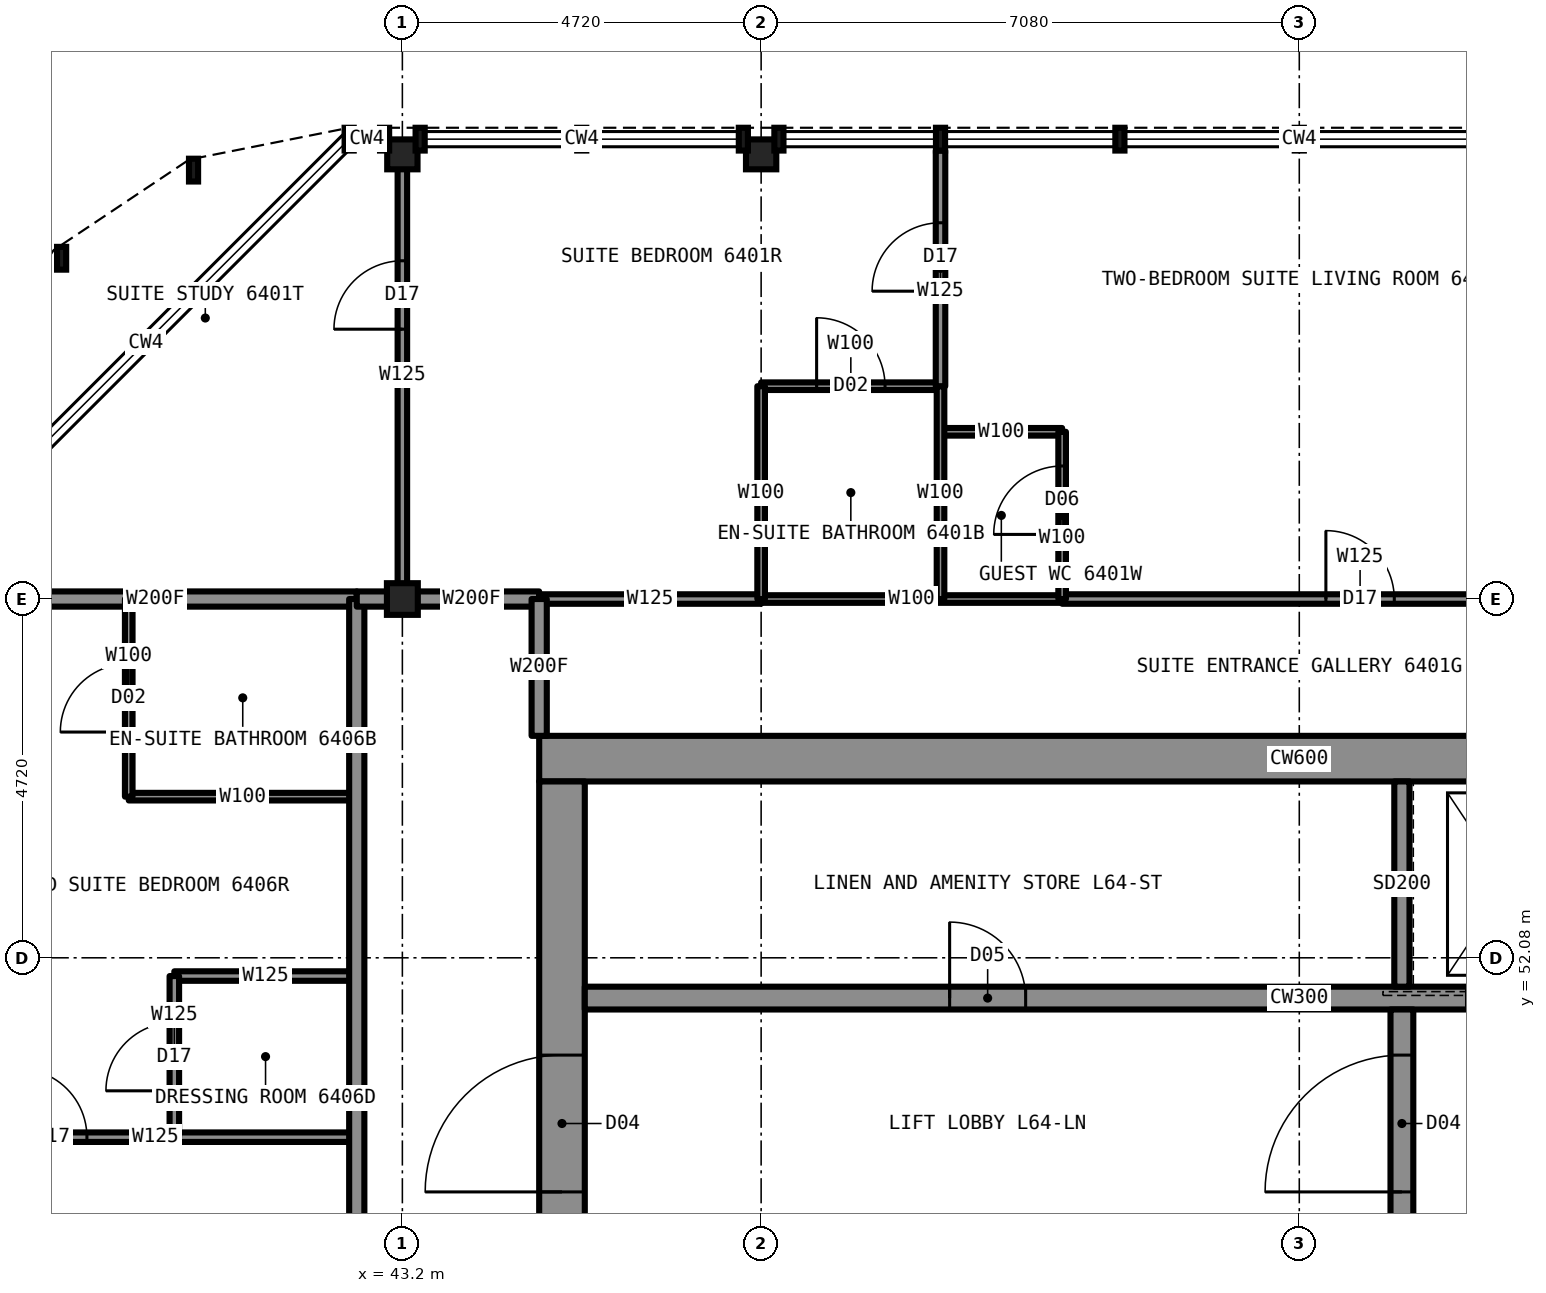
"""IFC4 building model, lengths in metres.
Left out: names, types, materials, properties, quantities, classifications, styles, units other than length and angle.
Written with IfcOpenShell. Run it as: python <this file> out.ifc"""

import sys

from ifc_helpers import new_model, si_unit, direction, frame, frame_2d, origin, origin_2d, place, context, subcontext, project, spatial, rectangle, i_section, extrude, element, fill, save


model = new_model("IFC4")
c1 = context("Model", 3, precision=1e-05, world=origin(), true_north=direction((0.0, 1.0)))
c2 = subcontext(c1, "Body", "Model", "MODEL_VIEW")
j1 = project(units=[si_unit("LENGTHUNIT", "METRE"), si_unit("PLANEANGLEUNIT", "RADIAN")], contexts=[c1])
p1 = place(None, origin())
s1 = spatial("IfcSite", under=j1, at=p1, CompositionType="ELEMENT")
p2 = place(p1, origin())
s2 = spatial("IfcBuilding", under=s1, at=p2, CompositionType="ELEMENT")
p3 = place(p2, frame((0.0, 0.0, 237.2)))
s3 = spatial("IfcBuildingStorey", under=s2, at=p3, CompositionType="ELEMENT", Elevation=237.2)
for number, where, z_axis, x_axis in (
    (1, (43.2, 62.65, 0.0), (0.0, 0.0, 1.0), (1.0, 0.0, 0.0)),
    (2, (47.92, 62.65, 0.0), (0.0, 0.0, 1.0), (1.0, 0.0, 0.0)),
):
    element("IfcColumn", number, at=place(p3, frame(where, z_axis=z_axis, x_axis=x_axis)), inside=s3, PredefinedType="COLUMN", context=c2, shape_type="SweptSolid", body=[
        extrude(i_section(OverallWidth=0.399, OverallDepth=0.394, WebThickness=0.023, FlangeThickness=0.037, at=origin_2d()), origin(), (0.0, 0.0, 1.0), 3.5),
    ])
p4 = place(p3, frame((43.2, 56.8, 0.0), z_axis=(0.0, 0.0, 1.0), x_axis=(1.0, 0.0, 0.0)))
e3 = element("IfcColumn", 3, at=p4, inside=s3, PredefinedType="COLUMN", context=c2, shape_type="SweptSolid", body=[
    extrude(i_section(OverallWidth=0.406, OverallDepth=0.417, WebThickness=0.03, FlangeThickness=0.048, at=origin_2d()), origin(), (0.0, 0.0, 1.0), 3.5),
])
p5 = place(p3, frame((45.0, 54.7, 0.0), z_axis=(0.0, 0.0, 1.0), x_axis=(1.0, 0.0, 0.0)))
e4 = element("IfcWall", 4, at=p5, inside=s3, PredefinedType="SHEAR", context=c2, shape_type="SweptSolid", body=[
    extrude(rectangle(XDim=20.0, YDim=0.6, at=frame_2d((10.0, 0.0))), origin(), (0.0, 0.0, 1.0), 3.5),
])
p6 = place(p3, frame((45.3, 35.6, 0.0), z_axis=(0.0, 0.0, 1.0), x_axis=(0.0, 1.0, 0.0)))
e5 = element("IfcWall", 5, at=p6, inside=s3, PredefinedType="SHEAR", context=c2, shape_type="SweptSolid", body=[
    extrude(rectangle(XDim=18.8, YDim=0.6, at=frame_2d((9.4, 0.0))), origin(), (0.0, 0.0, 1.0), 3.5),
])
p7 = place(p6, frame((13.4, 0.0, 0.0)))
e6 = element("IfcOpeningElement", 6, at=p7, cuts=e5, PredefinedType="OPENING", context=c2, shape_type="SweptSolid", body=[
    extrude(rectangle(XDim=1.8, YDim=2.2, at=frame_2d((0.9, 1.1))), frame((0.0, 0.31, 0.0), z_axis=(0.0, -1.0, 0.0), x_axis=(1.0, 0.0, 0.0)), (0.0, 0.0, 1.0), 0.62),
])
p8 = place(p6, frame((3.6, 0.0, 0.0)))
e7 = element("IfcOpeningElement", 7, at=p8, cuts=e5, PredefinedType="OPENING", context=c2, shape_type="SweptSolid", body=[
    extrude(rectangle(XDim=1.8, YDim=2.2, at=frame_2d((0.9, 1.1))), frame((0.0, 0.31, 0.0), z_axis=(0.0, -1.0, 0.0), x_axis=(1.0, 0.0, 0.0)), (0.0, 0.0, 1.0), 0.62),
])
p9 = place(p6, frame((6.4, 0.0, 0.0)))
e8 = element("IfcOpeningElement", 8, at=p9, cuts=e5, PredefinedType="OPENING", context=c2, shape_type="SweptSolid", body=[
    extrude(rectangle(XDim=1.2, YDim=2.2, at=frame_2d((0.6, 1.1))), frame((0.0, 0.31, 0.0), z_axis=(0.0, -1.0, 0.0), x_axis=(1.0, 0.0, 0.0)), (0.0, 0.0, 1.0), 0.62),
])
p10 = place(p3, frame((45.6, 51.55, 0.0), z_axis=(0.0, 0.0, 1.0), x_axis=(1.0, 0.0, 0.0)))
e9 = element("IfcWall", 9, at=p10, inside=s3, PredefinedType="SHEAR", context=c2, shape_type="SweptSolid", body=[
    extrude(rectangle(XDim=18.8, YDim=0.3, at=frame_2d((9.4, 0.0))), origin(), (0.0, 0.0, 1.0), 3.5),
])
p11 = place(p10, frame((4.8, 0.0, 0.0)))
e10 = element("IfcOpeningElement", 10, at=p11, cuts=e9, PredefinedType="OPENING", context=c2, shape_type="SweptSolid", body=[
    extrude(rectangle(XDim=1.0, YDim=2.1, at=frame_2d((0.5, 1.05))), frame((0.0, 0.16, 0.0), z_axis=(0.0, -1.0, 0.0), x_axis=(1.0, 0.0, 0.0)), (0.0, 0.0, 1.0), 0.32),
])
p12 = place(p10, frame((11.6, 0.0, 0.0)))
e11 = element("IfcOpeningElement", 11, at=p12, cuts=e9, PredefinedType="OPENING", context=c2, shape_type="SweptSolid", body=[
    extrude(rectangle(XDim=1.1, YDim=2.2, at=frame_2d((0.55, 1.1))), frame((0.0, 0.16, 0.0), z_axis=(0.0, -1.0, 0.0), x_axis=(1.0, 0.0, 0.0)), (0.0, 0.0, 1.0), 0.32),
])
p13 = place(p10, frame((14.3, 0.0, 0.0)))
e12 = element("IfcOpeningElement", 12, at=p13, cuts=e9, PredefinedType="OPENING", context=c2, shape_type="SweptSolid", body=[
    extrude(rectangle(XDim=1.1, YDim=2.2, at=frame_2d((0.55, 1.1))), frame((0.0, 0.16, 0.0), z_axis=(0.0, -1.0, 0.0), x_axis=(1.0, 0.0, 0.0)), (0.0, 0.0, 1.0), 0.32),
])
p14 = place(p3, frame((56.35, 41.9, 0.0), z_axis=(0.0, 0.0, 1.0), x_axis=(0.0, 1.0, 0.0)))
e13 = element("IfcWall", 13, at=p14, inside=s3, PredefinedType="SHEAR", context=c2, shape_type="SweptSolid", body=[
    extrude(rectangle(XDim=9.5, YDim=0.3, at=frame_2d((4.75, 0.0))), origin(), (0.0, 0.0, 1.0), 3.5),
])
p15 = place(p14, frame((7.1, 0.0, 0.0)))
e14 = element("IfcOpeningElement", 14, at=p15, cuts=e13, PredefinedType="OPENING", context=c2, shape_type="SweptSolid", body=[
    extrude(rectangle(XDim=1.8, YDim=2.2, at=frame_2d((0.9, 1.1))), frame((0.0, 0.16, 0.0), z_axis=(0.0, -1.0, 0.0), x_axis=(1.0, 0.0, 0.0)), (0.0, 0.0, 1.0), 0.32),
])
p16 = place(p3, frame((47.92, 56.8, 0.0), z_axis=(0.0, 0.0, 1.0), x_axis=(1.0, 0.0, 0.0)))
e15 = element("IfcWall", 15, at=p16, inside=s3, PredefinedType="PARTITIONING", context=c2, shape_type="SweptSolid", body=[
    extrude(rectangle(XDim=3.96, YDim=0.1, at=frame_2d((1.98, 0.0))), origin(), (0.0, 0.0, 1.0), 3.33),
])
p17 = place(p3, frame((43.22, 56.8, 0.0), z_axis=(0.0, 0.0, 1.0), x_axis=(1.0, 0.0, 0.0)))
e16 = element("IfcWall", 16, at=p17, inside=s3, PredefinedType="PARTITIONING", context=c2, shape_type="SweptSolid", body=[
    extrude(rectangle(XDim=1.78, YDim=0.2, at=frame_2d((0.89, 0.0))), origin(), (0.0, 0.0, 1.0), 3.33),
])
p18 = place(p3, frame((37.3, 56.8, 0.0), z_axis=(0.0, 0.0, 1.0), x_axis=(1.0, 0.0, 0.0)))
e17 = element("IfcWall", 17, at=p18, inside=s3, PredefinedType="PARTITIONING", context=c2, shape_type="SweptSolid", body=[
    extrude(rectangle(XDim=5.3, YDim=0.2, at=frame_2d((2.65, 0.0))), origin(), (0.0, 0.0, 1.0), 2.573),
])
p19 = place(p3, frame((45.0, 56.8, 0.0), z_axis=(0.0, 0.0, 1.0), x_axis=(1.0, 0.0, 0.0)))
e18 = element("IfcWall", 18, at=p19, inside=s3, PredefinedType="PARTITIONING", context=c2, shape_type="SweptSolid", body=[
    extrude(rectangle(XDim=2.92, YDim=0.125, at=frame_2d((1.46, 0.0))), origin(), (0.0, 0.0, 1.0), 3.33),
])
p20 = place(p3, frame((51.88, 56.8, 0.0), z_axis=(0.0, 0.0, 1.0), x_axis=(1.0, 0.0, 0.0)))
e19 = element("IfcWall", 19, at=p20, inside=s3, PredefinedType="PARTITIONING", context=c2, shape_type="SweptSolid", body=[
    extrude(rectangle(XDim=7.84, YDim=0.125, at=frame_2d((3.92, 0.0))), origin(), (0.0, 0.0, 1.0), 3.33),
])
p21 = place(p20, frame((3.47, 0.0, 0.0)))
e20 = element("IfcOpeningElement", 20, at=p21, cuts=e19, PredefinedType="OPENING", context=c2, shape_type="SweptSolid", body=[
    extrude(rectangle(XDim=0.9, YDim=2.2, at=frame_2d((0.45, 1.1))), frame((0.0, 0.073, 0.0), z_axis=(0.0, -1.0, 0.0), x_axis=(1.0, 0.0, 0.0)), (0.0, 0.0, 1.0), 0.145),
])
p22 = place(p3, frame((50.28, 59.0, 0.0), z_axis=(0.0, 0.0, 1.0), x_axis=(1.0, 0.0, 0.0)))
e21 = element("IfcWall", 21, at=p22, inside=s3, PredefinedType="PARTITIONING", context=c2, shape_type="SweptSolid", body=[
    extrude(rectangle(XDim=1.6, YDim=0.1, at=frame_2d((0.8, 0.0))), origin(), (0.0, 0.0, 1.0), 3.33),
])
p23 = place(p3, frame((47.92, 59.6, 0.0), z_axis=(0.0, 0.0, 1.0), x_axis=(1.0, 0.0, 0.0)))
e22 = element("IfcWall", 22, at=p23, inside=s3, PredefinedType="PARTITIONING", context=c2, shape_type="SweptSolid", body=[
    extrude(rectangle(XDim=2.36, YDim=0.1, at=frame_2d((1.18, 0.0))), origin(), (0.0, 0.0, 1.0), 3.33),
])
p24 = place(p23, frame((0.73, 0.0, 0.0)))
e23 = element("IfcOpeningElement", 23, at=p24, cuts=e22, PredefinedType="OPENING", context=c2, shape_type="SweptSolid", body=[
    extrude(rectangle(XDim=0.9, YDim=2.1, at=frame_2d((0.45, 1.05))), frame((0.0, 0.06, 0.0), z_axis=(0.0, -1.0, 0.0), x_axis=(1.0, 0.0, 0.0)), (0.0, 0.0, 1.0), 0.12),
])
p25 = place(p3, frame((37.3, 49.72, 0.0), z_axis=(0.0, 0.0, 1.0), x_axis=(1.0, 0.0, 0.0)))
e24 = element("IfcWall", 24, at=p25, inside=s3, PredefinedType="PARTITIONING", context=c2, shape_type="SweptSolid", body=[
    extrude(rectangle(XDim=5.3, YDim=0.125, at=frame_2d((2.65, 0.0))), origin(), (0.0, 0.0, 1.0), 2.797),
])
p26 = place(p25, frame((0.85, 0.0, 0.0)))
e25 = element("IfcOpeningElement", 25, at=p26, cuts=e24, PredefinedType="OPENING", context=c2, shape_type="SweptSolid", body=[
    extrude(rectangle(XDim=0.9, YDim=2.2, at=frame_2d((0.45, 1.1))), frame((0.0, 0.073, 0.0), z_axis=(0.0, -1.0, 0.0), x_axis=(1.0, 0.0, 0.0)), (0.0, 0.0, 1.0), 0.145),
])
p27 = place(p3, frame((40.2, 51.84, 0.0), z_axis=(0.0, 0.0, 1.0), x_axis=(1.0, 0.0, 0.0)))
e26 = element("IfcWall", 26, at=p27, inside=s3, PredefinedType="PARTITIONING", context=c2, shape_type="SweptSolid", body=[
    extrude(rectangle(XDim=2.4, YDim=0.125, at=frame_2d((1.2, 0.0))), origin(), (0.0, 0.0, 1.0), 3.33),
])
p28 = place(p3, frame((39.6, 54.2, 0.0), z_axis=(0.0, 0.0, 1.0), x_axis=(1.0, 0.0, 0.0)))
e27 = element("IfcWall", 27, at=p28, inside=s3, PredefinedType="PARTITIONING", context=c2, shape_type="SweptSolid", body=[
    extrude(rectangle(XDim=3.0, YDim=0.1, at=frame_2d((1.5, 0.0))), origin(), (0.0, 0.0, 1.0), 3.33),
])
p29 = place(p3, frame((45.0, 55.0, 0.0), z_axis=(0.0, 0.0, 1.0), x_axis=(0.0, 1.0, 0.0)))
e28 = element("IfcWall", 28, at=p29, inside=s3, PredefinedType="PARTITIONING", context=c2, shape_type="SweptSolid", body=[
    extrude(rectangle(XDim=1.8, YDim=0.2, at=frame_2d((0.9, 0.0))), origin(), (0.0, 0.0, 1.0), 3.33),
])
p30 = place(p3, frame((43.2, 56.8, 0.0), z_axis=(0.0, 0.0, 1.0), x_axis=(0.0, 1.0, 0.0)))
e29 = element("IfcWall", 29, at=p30, inside=s3, PredefinedType="PARTITIONING", context=c2, shape_type="SweptSolid", body=[
    extrude(rectangle(XDim=5.9, YDim=0.125, at=frame_2d((2.95, 0.0))), origin(), (0.0, 0.0, 1.0), 2.573),
])
p31 = place(p30, frame((3.55, 0.0, 0.0)))
e30 = element("IfcOpeningElement", 30, at=p31, cuts=e29, PredefinedType="OPENING", context=c2, shape_type="SweptSolid", body=[
    extrude(rectangle(XDim=0.9, YDim=2.2, at=frame_2d((0.45, 1.1))), frame((0.0, 0.073, 0.0), z_axis=(0.0, -1.0, 0.0), x_axis=(1.0, 0.0, 0.0)), (0.0, 0.0, 1.0), 0.145),
])
p32 = place(p3, frame((42.6, 33.2, 0.0), z_axis=(0.0, 0.0, 1.0), x_axis=(0.0, 1.0, 0.0)))
e31 = element("IfcWall", 31, at=p32, inside=s3, PredefinedType="PARTITIONING", context=c2, shape_type="SweptSolid", body=[
    extrude(rectangle(XDim=23.6, YDim=0.2, at=frame_2d((11.8, 0.0))), origin(), (0.0, 0.0, 1.0), 3.33),
])
p33 = place(p32, frame((8.95, 0.0, 0.0)))
e32 = element("IfcOpeningElement", 32, at=p33, cuts=e31, PredefinedType="OPENING", context=c2, shape_type="SweptSolid", body=[
    extrude(rectangle(XDim=1.1, YDim=2.2, at=frame_2d((0.55, 1.1))), frame((0.0, 0.11, 0.0), z_axis=(0.0, -1.0, 0.0), x_axis=(1.0, 0.0, 0.0)), (0.0, 0.0, 1.0), 0.22),
])
p34 = place(p32, frame((0.7, 0.0, 0.0)))
e33 = element("IfcOpeningElement", 33, at=p34, cuts=e31, PredefinedType="OPENING", context=c2, shape_type="SweptSolid", body=[
    extrude(rectangle(XDim=1.0, YDim=2.1, at=frame_2d((0.5, 1.05))), frame((0.0, 0.11, 0.0), z_axis=(0.0, -1.0, 0.0), x_axis=(1.0, 0.0, 0.0)), (0.0, 0.0, 1.0), 0.22),
])
p35 = place(p3, frame((40.2, 49.72, 0.0), z_axis=(0.0, 0.0, 1.0), x_axis=(0.0, 1.0, 0.0)))
e34 = element("IfcWall", 34, at=p35, inside=s3, PredefinedType="PARTITIONING", context=c2, shape_type="SweptSolid", body=[
    extrude(rectangle(XDim=2.12, YDim=0.125, at=frame_2d((1.06, 0.0))), origin(), (0.0, 0.0, 1.0), 3.33),
])
p36 = place(p35, frame((0.61, 0.0, 0.0)))
e35 = element("IfcOpeningElement", 35, at=p36, cuts=e34, PredefinedType="OPENING", context=c2, shape_type="SweptSolid", body=[
    extrude(rectangle(XDim=0.9, YDim=2.2, at=frame_2d((0.45, 1.1))), frame((0.0, 0.073, 0.0), z_axis=(0.0, -1.0, 0.0), x_axis=(1.0, 0.0, 0.0)), (0.0, 0.0, 1.0), 0.145),
])
p37 = place(p3, frame((39.6, 54.2, 0.0), z_axis=(0.0, 0.0, 1.0), x_axis=(0.0, 1.0, 0.0)))
e36 = element("IfcWall", 36, at=p37, inside=s3, PredefinedType="PARTITIONING", context=c2, shape_type="SweptSolid", body=[
    extrude(rectangle(XDim=2.6, YDim=0.1, at=frame_2d((1.3, 0.0))), origin(), (0.0, 0.0, 1.0), 3.33),
])
p38 = place(p37, frame((0.85, 0.0, 0.0)))
e37 = element("IfcOpeningElement", 37, at=p38, cuts=e36, PredefinedType="OPENING", context=c2, shape_type="SweptSolid", body=[
    extrude(rectangle(XDim=0.9, YDim=2.1, at=frame_2d((0.45, 1.05))), frame((0.0, 0.06, 0.0), z_axis=(0.0, -1.0, 0.0), x_axis=(1.0, 0.0, 0.0)), (0.0, 0.0, 1.0), 0.12),
])
p39 = place(p3, frame((51.88, 56.8, 0.0), z_axis=(0.0, 0.0, 1.0), x_axis=(0.0, 1.0, 0.0)))
e38 = element("IfcWall", 38, at=p39, inside=s3, PredefinedType="PARTITIONING", context=c2, shape_type="SweptSolid", body=[
    extrude(rectangle(XDim=2.2, YDim=0.1, at=frame_2d((1.1, 0.0))), origin(), (0.0, 0.0, 1.0), 3.33),
])
p40 = place(p39, frame((0.85, 0.0, 0.0)))
e39 = element("IfcOpeningElement", 39, at=p40, cuts=e38, PredefinedType="OPENING", context=c2, shape_type="SweptSolid", body=[
    extrude(rectangle(XDim=0.9, YDim=2.1, at=frame_2d((0.45, 1.05))), frame((0.0, 0.06, 0.0), z_axis=(0.0, -1.0, 0.0), x_axis=(1.0, 0.0, 0.0)), (0.0, 0.0, 1.0), 0.12),
])
p41 = place(p3, frame((50.28, 56.8, 0.0), z_axis=(0.0, 0.0, 1.0), x_axis=(0.0, 1.0, 0.0)))
e40 = element("IfcWall", 40, at=p41, inside=s3, PredefinedType="PARTITIONING", context=c2, shape_type="SweptSolid", body=[
    extrude(rectangle(XDim=2.8, YDim=0.1, at=frame_2d((1.4, 0.0))), origin(), (0.0, 0.0, 1.0), 3.33),
])
p42 = place(p3, frame((50.28, 59.6, 0.0), z_axis=(0.0, 0.0, 1.0), x_axis=(0.0, 1.0, 0.0)))
e41 = element("IfcWall", 41, at=p42, inside=s3, PredefinedType="PARTITIONING", context=c2, shape_type="SweptSolid", body=[
    extrude(rectangle(XDim=3.1, YDim=0.125, at=frame_2d((1.55, 0.0))), origin(), (0.0, 0.0, 1.0), 3.33),
])
p43 = place(p42, frame((1.25, 0.0, 0.0)))
e42 = element("IfcOpeningElement", 42, at=p43, cuts=e41, PredefinedType="OPENING", context=c2, shape_type="SweptSolid", body=[
    extrude(rectangle(XDim=0.9, YDim=2.2, at=frame_2d((0.45, 1.1))), frame((0.0, 0.073, 0.0), z_axis=(0.0, -1.0, 0.0), x_axis=(1.0, 0.0, 0.0)), (0.0, 0.0, 1.0), 0.145),
])
p44 = place(p3, frame((47.92, 56.8, 0.0), z_axis=(0.0, 0.0, 1.0), x_axis=(0.0, 1.0, 0.0)))
e43 = element("IfcWall", 43, at=p44, inside=s3, PredefinedType="PARTITIONING", context=c2, shape_type="SweptSolid", body=[
    extrude(rectangle(XDim=2.8, YDim=0.1, at=frame_2d((1.4, 0.0))), origin(), (0.0, 0.0, 1.0), 2.573),
])
p45 = place(p3, frame((56.35, 51.7, 0.0), z_axis=(0.0, 0.0, 1.0), x_axis=(0.0, 1.0, 0.0)))
e44 = element("IfcWall", 44, at=p45, inside=s3, PredefinedType="PARTITIONING", context=c2, shape_type="SweptSolid", body=[
    extrude(rectangle(XDim=2.7, YDim=0.2, at=frame_2d((1.35, 0.0))), origin(), (0.0, 0.0, 1.0), 3.33),
])
p46 = place(p3, frame((42.6, 56.8, 0.0), z_axis=(0.0, 0.0, 1.0), x_axis=(1.0, 0.0, 0.0)))
e45 = element("IfcWall", 45, at=p46, inside=s3, PredefinedType="PARTITIONING", context=c2, shape_type="SweptSolid", body=[
    extrude(rectangle(XDim=0.62, YDim=0.2, at=frame_2d((0.31, 0.0))), origin(), (0.0, 0.0, 1.0), 2.573),
])
p47 = place(p21, origin())
e46 = element("IfcDoor", 46, at=p47, inside=s3, OperationType="SINGLE_SWING_LEFT", PredefinedType="DOOR", context=c2, shape_type="SweptSolid", body=[
    extrude(rectangle(XDim=0.9, YDim=2.2, at=frame_2d((0.45, 1.1))), frame((0.0, 0.025, 0.0), z_axis=(0.0, -1.0, 0.0), x_axis=(1.0, 0.0, 0.0)), (0.0, 0.0, 1.0), 0.05),
])
fill(e20, e46)
p48 = place(p24, origin())
e47 = element("IfcDoor", 47, at=p48, inside=s3, OperationType="SINGLE_SWING_RIGHT", PredefinedType="DOOR", context=c2, shape_type="SweptSolid", body=[
    extrude(rectangle(XDim=0.9, YDim=2.1, at=frame_2d((0.45, 1.05))), frame((0.0, 0.025, 0.0), z_axis=(0.0, -1.0, 0.0), x_axis=(1.0, 0.0, 0.0)), (0.0, 0.0, 1.0), 0.05),
])
fill(e23, e47)
p49 = place(p43, origin())
e48 = element("IfcDoor", 48, at=p49, inside=s3, OperationType="SINGLE_SWING_LEFT", PredefinedType="DOOR", context=c2, shape_type="SweptSolid", body=[
    extrude(rectangle(XDim=0.9, YDim=2.2, at=frame_2d((0.45, 1.1))), frame((0.0, 0.025, 0.0), z_axis=(0.0, -1.0, 0.0), x_axis=(1.0, 0.0, 0.0)), (0.0, 0.0, 1.0), 0.05),
])
fill(e42, e48)
p50 = place(p31, origin())
e49 = element("IfcDoor", 49, at=p50, inside=s3, OperationType="SINGLE_SWING_LEFT", PredefinedType="DOOR", context=c2, shape_type="SweptSolid", body=[
    extrude(rectangle(XDim=0.9, YDim=2.2, at=frame_2d((0.45, 1.1))), frame((0.0, 0.025, 0.0), z_axis=(0.0, -1.0, 0.0), x_axis=(1.0, 0.0, 0.0)), (0.0, 0.0, 1.0), 0.05),
])
fill(e30, e49)
p51 = place(p40, origin())
e50 = element("IfcDoor", 50, at=p51, inside=s3, OperationType="SINGLE_SWING_LEFT", PredefinedType="DOOR", context=c2, shape_type="SweptSolid", body=[
    extrude(rectangle(XDim=0.9, YDim=2.1, at=frame_2d((0.45, 1.05))), frame((0.0, 0.025, 0.0), z_axis=(0.0, -1.0, 0.0), x_axis=(1.0, 0.0, 0.0)), (0.0, 0.0, 1.0), 0.05),
])
fill(e39, e50)
p52 = place(p38, origin())
e51 = element("IfcDoor", 51, at=p52, inside=s3, OperationType="SINGLE_SWING_RIGHT", PredefinedType="DOOR", context=c2, shape_type="SweptSolid", body=[
    extrude(rectangle(XDim=0.9, YDim=2.1, at=frame_2d((0.45, 1.05))), frame((0.0, 0.025, 0.0), z_axis=(0.0, -1.0, 0.0), x_axis=(1.0, 0.0, 0.0)), (0.0, 0.0, 1.0), 0.05),
])
fill(e37, e51)
p53 = place(p36, origin())
e52 = element("IfcDoor", 52, at=p53, inside=s3, OperationType="SINGLE_SWING_LEFT", PredefinedType="DOOR", context=c2, shape_type="SweptSolid", body=[
    extrude(rectangle(XDim=0.9, YDim=2.2, at=frame_2d((0.45, 1.1))), frame((0.0, 0.025, 0.0), z_axis=(0.0, -1.0, 0.0), x_axis=(1.0, 0.0, 0.0)), (0.0, 0.0, 1.0), 0.05),
])
fill(e35, e52)
p54 = place(p26, origin())
e53 = element("IfcDoor", 53, at=p54, inside=s3, OperationType="SINGLE_SWING_LEFT", PredefinedType="DOOR", context=c2, shape_type="SweptSolid", body=[
    extrude(rectangle(XDim=0.9, YDim=2.2, at=frame_2d((0.45, 1.1))), frame((0.0, 0.025, 0.0), z_axis=(0.0, -1.0, 0.0), x_axis=(1.0, 0.0, 0.0)), (0.0, 0.0, 1.0), 0.05),
])
fill(e25, e53)
p55 = place(p7, origin())
e54 = element("IfcDoor", 54, at=p55, inside=s3, OperationType="DOUBLE_DOOR_SINGLE_SWING", PredefinedType="DOOR", context=c2, shape_type="SweptSolid", body=[
    extrude(rectangle(XDim=1.8, YDim=2.2, at=frame_2d((0.9, 1.1))), frame((0.0, 0.025, 0.0), z_axis=(0.0, -1.0, 0.0), x_axis=(1.0, 0.0, 0.0)), (0.0, 0.0, 1.0), 0.05),
])
fill(e6, e54)
p56 = place(p15, origin())
e55 = element("IfcDoor", 55, at=p56, inside=s3, OperationType="DOUBLE_DOOR_SINGLE_SWING", PredefinedType="DOOR", context=c2, shape_type="SweptSolid", body=[
    extrude(rectangle(XDim=1.8, YDim=2.2, at=frame_2d((0.9, 1.1))), frame((0.0, 0.025, 0.0), z_axis=(0.0, -1.0, 0.0), x_axis=(1.0, 0.0, 0.0)), (0.0, 0.0, 1.0), 0.05),
])
fill(e14, e55)
p57 = place(p11, origin())
e56 = element("IfcDoor", 56, at=p57, inside=s3, OperationType="SINGLE_SWING_LEFT", PredefinedType="DOOR", context=c2, shape_type="SweptSolid", body=[
    extrude(rectangle(XDim=1.0, YDim=2.1, at=frame_2d((0.5, 1.05))), frame((0.0, 0.025, 0.0), z_axis=(0.0, -1.0, 0.0), x_axis=(1.0, 0.0, 0.0)), (0.0, 0.0, 1.0), 0.05),
])
fill(e10, e56)
save(model, sys.argv[1])
